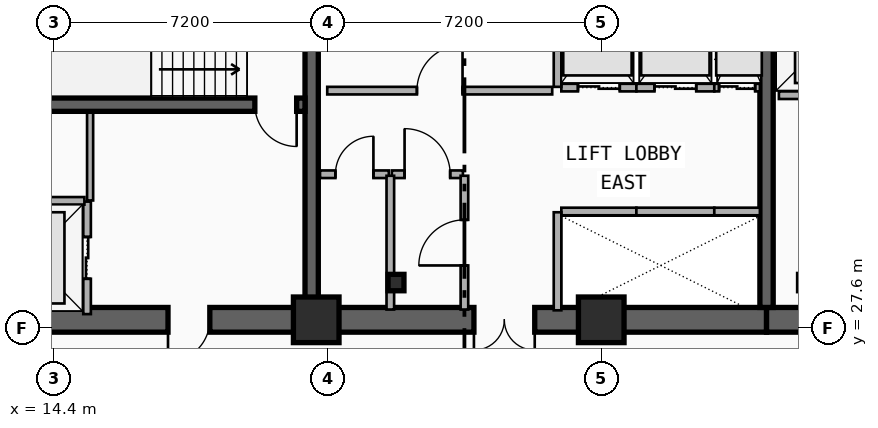
"""IFC4 building model, lengths in metres.
Left out: names, types, materials, properties, quantities, classifications, styles, units other than length and angle.
Written with IfcOpenShell. Run it as: python <this file> out.ifc"""

import sys

from ifc_helpers import new_model, si_unit, direction, frame, frame_2d, origin, origin_2d, place, context, subcontext, project, spatial, rectangle, i_section, extrude, element, fill, save


model = new_model("IFC4")
c1 = context("Model", 3, precision=1e-05, world=origin(), true_north=direction((0.0, 1.0)))
c2 = subcontext(c1, "Body", "Model", "MODEL_VIEW")
j1 = project(units=[si_unit("LENGTHUNIT", "METRE"), si_unit("PLANEANGLEUNIT", "RADIAN")], contexts=[c1])
p1 = place(None, origin())
s1 = spatial("IfcSite", under=j1, at=p1, CompositionType="ELEMENT")
p2 = place(p1, origin())
s2 = spatial("IfcBuilding", under=s1, at=p2, CompositionType="ELEMENT")
p3 = place(p2, frame((0.0, 0.0, 94.3)))
s3 = spatial("IfcBuildingStorey", under=s2, at=p3, CompositionType="ELEMENT", Elevation=94.3)
p4 = place(p3, frame((21.18, 27.82, 0.0), z_axis=(0.0, 0.0, 1.0), x_axis=(-1.0, 0.0, 0.0)))
e1 = element("IfcWall", 1, at=p4, inside=s3, PredefinedType="SHEAR", context=c2, shape_type="SweptSolid", body=[
    extrude(rectangle(XDim=9.03, YDim=0.65, at=frame_2d((4.515, 0.0))), origin(), (0.0, 0.0, 1.0), 3.5),
])
p5 = place(p4, frame((2.68, 0.0, 0.0)))
e2 = element("IfcOpeningElement", 2, at=p5, cuts=e1, PredefinedType="OPENING", context=c2, shape_type="SweptSolid", body=[
    extrude(rectangle(XDim=1.1, YDim=2.15, at=frame_2d((0.55, 1.075))), frame((0.0, 0.335, 0.0), z_axis=(0.0, -1.0, 0.0), x_axis=(1.0, 0.0, 0.0)), (0.0, 0.0, 1.0), 0.67),
])
p6 = place(p3, frame((33.15, 27.82, 0.0), z_axis=(0.0, 0.0, 1.0), x_axis=(-1.0, 0.0, 0.0)))
e3 = element("IfcWall", 3, at=p6, inside=s3, PredefinedType="SHEAR", context=c2, shape_type="SweptSolid", body=[
    extrude(rectangle(XDim=11.97, YDim=0.65, at=frame_2d((5.985, 0.0))), origin(), (0.0, 0.0, 1.0), 3.5),
])
p7 = place(p6, frame((6.1, 0.0, 0.0)))
e4 = element("IfcOpeningElement", 4, at=p7, cuts=e3, PredefinedType="OPENING", context=c2, shape_type="SweptSolid", body=[
    extrude(rectangle(XDim=1.6, YDim=2.2, at=frame_2d((0.8, 1.1))), frame((0.0, 0.335, 0.0), z_axis=(0.0, -1.0, 0.0), x_axis=(1.0, 0.0, 0.0)), (0.0, 0.0, 1.0), 0.67),
])
p8 = place(p3, frame((45.38, 27.82, 0.0), z_axis=(0.0, 0.0, 1.0), x_axis=(-1.0, 0.0, 0.0)))
e5 = element("IfcWall", 5, at=p8, inside=s3, PredefinedType="SHEAR", context=c2, shape_type="SweptSolid", body=[
    extrude(rectangle(XDim=12.23, YDim=0.65, at=frame_2d((6.115, 0.0))), origin(), (0.0, 0.0, 1.0), 3.5),
])
p9 = place(p8, frame((9.93, 0.0, 0.0)))
e6 = element("IfcOpeningElement", 6, at=p9, cuts=e5, PredefinedType="OPENING", context=c2, shape_type="SweptSolid", body=[
    extrude(rectangle(XDim=1.1, YDim=2.15, at=frame_2d((0.55, 1.075))), frame((0.0, 0.335, 0.0), z_axis=(0.0, -1.0, 0.0), x_axis=(1.0, 0.0, 0.0)), (0.0, 0.0, 1.0), 0.67),
])
p10 = place(p8, frame((6.23, 0.0, 0.0)))
e7 = element("IfcOpeningElement", 7, at=p10, cuts=e5, PredefinedType="OPENING", context=c2, shape_type="SweptSolid", body=[
    extrude(rectangle(XDim=1.1, YDim=2.15, at=frame_2d((0.55, 1.075))), frame((0.0, 0.335, 0.0), z_axis=(0.0, -1.0, 0.0), x_axis=(1.0, 0.0, 0.0)), (0.0, 0.0, 1.0), 0.67),
])
for number, where, z_axis, x_axis in (
    (8, (21.18, 28.145, 0.0), (0.0, 0.0, 1.0), (0.0, 1.0, 0.0)),
    (9, (33.15, 28.145, 0.0), (0.0, 0.0, 1.0), (0.0, 1.0, 0.0)),
):
    element("IfcWall", number, at=place(p3, frame(where, z_axis=z_axis, x_axis=x_axis)), inside=s3, PredefinedType="SHEAR", context=c2, shape_type="SweptSolid", body=[
        extrude(rectangle(XDim=8.58, YDim=0.35, at=frame_2d((4.29, 0.0))), origin(), (0.0, 0.0, 1.0), 3.5),
    ])
p11 = place(p3, frame((21.005, 33.48, 0.0), z_axis=(0.0, 0.0, 1.0), x_axis=(-1.0, 0.0, 0.0)))
e10 = element("IfcWall", 10, at=p11, inside=s3, PredefinedType="SHEAR", context=c2, shape_type="SweptSolid", body=[
    extrude(rectangle(XDim=8.53, YDim=0.35, at=frame_2d((4.265, 0.0))), origin(), (0.0, 0.0, 1.0), 3.5),
])
p12 = place(p11, frame((0.22, 0.0, 0.0)))
e11 = element("IfcOpeningElement", 11, at=p12, cuts=e10, PredefinedType="OPENING", context=c2, shape_type="SweptSolid", body=[
    extrude(rectangle(XDim=1.1, YDim=2.15, at=frame_2d((0.55, 1.075))), frame((0.0, 0.185, 0.0), z_axis=(0.0, -1.0, 0.0), x_axis=(1.0, 0.0, 0.0)), (0.0, 0.0, 1.0), 0.37),
])
p13 = place(p3, frame((23.4, 28.8, 0.0), z_axis=(0.0, 0.0, 1.0), x_axis=(1.0, 0.0, 0.0)))
e12 = element("IfcColumn", 12, at=p13, inside=s3, PredefinedType="COLUMN", context=c2, shape_type="SweptSolid", body=[
    extrude(i_section(OverallWidth=0.418, OverallDepth=0.432, WebThickness=0.035, FlangeThickness=0.056, FilletRadius=0.015, at=origin_2d()), origin(), (0.0, 0.0, 1.0), 3.5),
])
for number, where, z_axis, x_axis in (
    (13, (21.3, 27.82, 0.0), (0.0, 0.0, 1.0), (1.0, 0.0, 0.0)),
    (14, (28.8, 27.82, 0.0), (0.0, 0.0, 1.0), (1.0, 0.0, 0.0)),
):
    element("IfcColumn", number, at=place(p3, frame(where, z_axis=z_axis, x_axis=x_axis)), inside=s3, PredefinedType="COLUMN", context=c2, shape_type="SweptSolid", body=[
        extrude(rectangle(XDim=1.2, YDim=1.2, at=origin_2d()), origin(), (0.0, 0.0, 1.0), 3.5),
    ])
p14 = place(p3, frame((15.27, 27.97, 0.0), z_axis=(0.0, 0.0, 1.0), x_axis=(0.0, 1.0, 0.0)))
e15 = element("IfcWall", 15, at=p14, inside=s3, PredefinedType="PARTITIONING", context=c2, shape_type="SweptSolid", body=[
    extrude(rectangle(XDim=2.96, YDim=0.2, at=frame_2d((1.48, 0.0))), origin(), (0.0, 0.0, 1.0), 2.212),
])
p15 = place(p14, frame((0.93, 0.0, 0.0)))
e16 = element("IfcOpeningElement", 16, at=p15, cuts=e15, PredefinedType="OPENING", context=c2, shape_type="SweptSolid", body=[
    extrude(rectangle(XDim=1.1, YDim=2.15, at=frame_2d((0.55, 1.075))), frame((0.0, 0.11, 0.0), z_axis=(0.0, -1.0, 0.0), x_axis=(1.0, 0.0, 0.0)), (0.0, 0.0, 1.0), 0.22),
])
p16 = place(p3, frame((12.45, 30.95, 0.0), z_axis=(0.0, 0.0, 1.0), x_axis=(1.0, 0.0, 0.0)))
e17 = element("IfcWall", 17, at=p16, inside=s3, PredefinedType="PARTITIONING", context=c2, shape_type="SweptSolid", body=[
    extrude(rectangle(XDim=2.75, YDim=0.2, at=frame_2d((1.375, 0.0))), origin(), (0.0, 0.0, 1.0), 2.212),
])
p17 = place(p3, frame((33.475, 33.73, 0.0), z_axis=(0.0, 0.0, 1.0), x_axis=(1.0, 0.0, 0.0)))
e18 = element("IfcWall", 18, at=p17, inside=s3, PredefinedType="PARTITIONING", context=c2, shape_type="SweptSolid", body=[
    extrude(rectangle(XDim=2.725, YDim=0.2, at=frame_2d((1.362, 0.0))), origin(), (0.0, 0.0, 1.0), 2.212),
])
p18 = place(p17, frame((0.812, 0.0, 0.0)))
e19 = element("IfcOpeningElement", 19, at=p18, cuts=e18, PredefinedType="OPENING", context=c2, shape_type="SweptSolid", body=[
    extrude(rectangle(XDim=1.1, YDim=2.15, at=frame_2d((0.55, 1.075))), frame((0.0, 0.11, 0.0), z_axis=(0.0, -1.0, 0.0), x_axis=(1.0, 0.0, 0.0)), (0.0, 0.0, 1.0), 0.22),
])
p19 = place(p3, frame((27.75, 30.67, 0.0), z_axis=(0.0, 0.0, 1.0), x_axis=(1.0, 0.0, 0.0)))
e20 = element("IfcWall", 20, at=p19, inside=s3, PredefinedType="PARTITIONING", context=c2, shape_type="SweptSolid", body=[
    extrude(rectangle(XDim=1.975, YDim=0.2, at=frame_2d((0.988, 0.0))), origin(), (0.0, 0.0, 1.0), 2.212),
])
p20 = place(p3, frame((27.65, 28.07, 0.0), z_axis=(0.0, 0.0, 1.0), x_axis=(0.0, 1.0, 0.0)))
e21 = element("IfcWall", 21, at=p20, inside=s3, PredefinedType="PARTITIONING", context=c2, shape_type="SweptSolid", body=[
    extrude(rectangle(XDim=2.58, YDim=0.2, at=frame_2d((1.29, 0.0))), origin(), (0.0, 0.0, 1.0), 2.212),
])
p21 = place(p3, frame((29.725, 30.67, 0.0), z_axis=(0.0, 0.0, 1.0), x_axis=(1.0, 0.0, 0.0)))
e22 = element("IfcWall", 22, at=p21, inside=s3, PredefinedType="PARTITIONING", context=c2, shape_type="SweptSolid", body=[
    extrude(rectangle(XDim=2.05, YDim=0.2, at=frame_2d((1.025, 0.0))), origin(), (0.0, 0.0, 1.0), 2.62),
])
p22 = place(p3, frame((31.775, 30.67, 0.0), z_axis=(0.0, 0.0, 1.0), x_axis=(1.0, 0.0, 0.0)))
e23 = element("IfcWall", 23, at=p22, inside=s3, PredefinedType="PARTITIONING", context=c2, shape_type="SweptSolid", body=[
    extrude(rectangle(XDim=1.2, YDim=0.2, at=frame_2d((0.6, 0.0))), origin(), (0.0, 0.0, 1.0), 2.62),
])
p23 = place(p3, frame((27.75, 33.93, 0.0), z_axis=(0.0, 0.0, 1.0), x_axis=(1.0, 0.0, 0.0)))
e24 = element("IfcWall", 24, at=p23, inside=s3, PredefinedType="PARTITIONING", context=c2, shape_type="SweptSolid", body=[
    extrude(rectangle(XDim=1.975, YDim=0.2, at=frame_2d((0.988, 0.0))), origin(), (0.0, 0.0, 1.0), 2.212),
])
p24 = place(p23, frame((0.438, 0.0, 0.0)))
e25 = element("IfcOpeningElement", 25, at=p24, cuts=e24, PredefinedType="OPENING", context=c2, shape_type="SweptSolid", body=[
    extrude(rectangle(XDim=1.1, YDim=2.15, at=frame_2d((0.55, 1.075))), frame((0.0, 0.11, 0.0), z_axis=(0.0, -1.0, 0.0), x_axis=(1.0, 0.0, 0.0)), (0.0, 0.0, 1.0), 0.22),
])
p25 = place(p3, frame((27.65, 33.95, 0.0), z_axis=(0.0, 0.0, 1.0), x_axis=(0.0, 1.0, 0.0)))
e26 = element("IfcWall", 26, at=p25, inside=s3, PredefinedType="PARTITIONING", context=c2, shape_type="SweptSolid", body=[
    extrude(rectangle(XDim=2.68, YDim=0.2, at=frame_2d((1.34, 0.0))), origin(), (0.0, 0.0, 1.0), 2.212),
])
p26 = place(p3, frame((29.725, 33.93, 0.0), z_axis=(0.0, 0.0, 1.0), x_axis=(1.0, 0.0, 0.0)))
e27 = element("IfcWall", 27, at=p26, inside=s3, PredefinedType="PARTITIONING", context=c2, shape_type="SweptSolid", body=[
    extrude(rectangle(XDim=2.05, YDim=0.2, at=frame_2d((1.025, 0.0))), origin(), (0.0, 0.0, 1.0), 3.24),
])
p27 = place(p26, frame((0.475, 0.0, 0.0)))
e28 = element("IfcOpeningElement", 28, at=p27, cuts=e27, PredefinedType="OPENING", context=c2, shape_type="SweptSolid", body=[
    extrude(rectangle(XDim=1.1, YDim=2.15, at=frame_2d((0.55, 1.075))), frame((0.0, 0.11, 0.0), z_axis=(0.0, -1.0, 0.0), x_axis=(1.0, 0.0, 0.0)), (0.0, 0.0, 1.0), 0.22),
])
p28 = place(p3, frame((31.775, 33.93, 0.0), z_axis=(0.0, 0.0, 1.0), x_axis=(1.0, 0.0, 0.0)))
e29 = element("IfcWall", 29, at=p28, inside=s3, PredefinedType="PARTITIONING", context=c2, shape_type="SweptSolid", body=[
    extrude(rectangle(XDim=1.2, YDim=0.2, at=frame_2d((0.6, 0.0))), origin(), (0.0, 0.0, 1.0), 3.24),
])
p29 = place(p28, frame((0.125, 0.0, 0.0)))
e30 = element("IfcOpeningElement", 30, at=p29, cuts=e29, PredefinedType="OPENING", context=c2, shape_type="SweptSolid", body=[
    extrude(rectangle(XDim=0.95, YDim=2.15, at=frame_2d((0.475, 1.075))), frame((0.0, 0.11, 0.0), z_axis=(0.0, -1.0, 0.0), x_axis=(1.0, 0.0, 0.0)), (0.0, 0.0, 1.0), 0.22),
])
p30 = place(p3, frame((21.4, 31.65, 0.0), z_axis=(0.0, 0.0, 1.0), x_axis=(1.0, 0.0, 0.0)))
e31 = element("IfcWall", 31, at=p30, inside=s3, PredefinedType="PARTITIONING", context=c2, shape_type="SweptSolid", body=[
    extrude(rectangle(XDim=1.81, YDim=0.2, at=frame_2d((0.905, 0.0))), origin(), (0.0, 0.0, 1.0), 2.28),
])
p31 = place(p30, frame((0.405, 0.0, 0.0)))
e32 = element("IfcOpeningElement", 32, at=p31, cuts=e31, PredefinedType="OPENING", context=c2, shape_type="SweptSolid", body=[
    extrude(rectangle(XDim=1.0, YDim=2.15, at=frame_2d((0.5, 1.075))), frame((0.0, 0.11, 0.0), z_axis=(0.0, -1.0, 0.0), x_axis=(1.0, 0.0, 0.0)), (0.0, 0.0, 1.0), 0.22),
])
p32 = place(p3, frame((23.29, 31.65, 0.0), z_axis=(0.0, 0.0, 1.0), x_axis=(1.0, 0.0, 0.0)))
e33 = element("IfcWall", 33, at=p32, inside=s3, PredefinedType="PARTITIONING", context=c2, shape_type="SweptSolid", body=[
    extrude(rectangle(XDim=1.87, YDim=0.2, at=frame_2d((0.935, 0.0))), origin(), (0.0, 0.0, 1.0), 3.24),
])
p33 = place(p32, frame((0.335, 0.0, 0.0)))
e34 = element("IfcOpeningElement", 34, at=p33, cuts=e33, PredefinedType="OPENING", context=c2, shape_type="SweptSolid", body=[
    extrude(rectangle(XDim=1.2, YDim=2.15, at=frame_2d((0.6, 1.075))), frame((0.0, 0.11, 0.0), z_axis=(0.0, -1.0, 0.0), x_axis=(1.0, 0.0, 0.0)), (0.0, 0.0, 1.0), 0.22),
])
p34 = place(p3, frame((21.59, 33.85, 0.0), z_axis=(0.0, 0.0, 1.0), x_axis=(1.0, 0.0, 0.0)))
e35 = element("IfcWall", 35, at=p34, inside=s3, PredefinedType="PARTITIONING", context=c2, shape_type="SweptSolid", body=[
    extrude(rectangle(XDim=5.92, YDim=0.2, at=frame_2d((2.96, 0.0))), origin(), (0.0, 0.0, 1.0), 2.28),
])
p35 = place(p34, frame((2.36, 0.0, 0.0)))
e36 = element("IfcOpeningElement", 36, at=p35, cuts=e35, PredefinedType="OPENING", context=c2, shape_type="SweptSolid", body=[
    extrude(rectangle(XDim=1.2, YDim=2.15, at=frame_2d((0.6, 1.075))), frame((0.0, 0.11, 0.0), z_axis=(0.0, -1.0, 0.0), x_axis=(1.0, 0.0, 0.0)), (0.0, 0.0, 1.0), 0.22),
])
p36 = place(p3, frame((25.2, 28.09, 0.0), z_axis=(0.0, 0.0, 1.0), x_axis=(0.0, 1.0, 0.0)))
e37 = element("IfcWall", 37, at=p36, inside=s3, PredefinedType="PARTITIONING", context=c2, shape_type="SweptSolid", body=[
    extrude(rectangle(XDim=3.52, YDim=0.2, at=frame_2d((1.76, 0.0))), origin(), (0.0, 0.0, 1.0), 2.62),
])
p37 = place(p36, frame((1.16, 0.0, 0.0)))
e38 = element("IfcOpeningElement", 38, at=p37, cuts=e37, PredefinedType="OPENING", context=c2, shape_type="SweptSolid", body=[
    extrude(rectangle(XDim=1.2, YDim=2.15, at=frame_2d((0.6, 1.075))), frame((0.0, 0.11, 0.0), z_axis=(0.0, -1.0, 0.0), x_axis=(1.0, 0.0, 0.0)), (0.0, 0.0, 1.0), 0.22),
])
p38 = place(p3, frame((23.25, 28.09, 0.0), z_axis=(0.0, 0.0, 1.0), x_axis=(0.0, 1.0, 0.0)))
e39 = element("IfcWall", 39, at=p38, inside=s3, PredefinedType="PARTITIONING", context=c2, shape_type="SweptSolid", body=[
    extrude(rectangle(XDim=3.52, YDim=0.2, at=frame_2d((1.76, 0.0))), origin(), (0.0, 0.0, 1.0), 2.62),
])
p39 = place(p3, frame((15.35, 30.96, 0.0), z_axis=(0.0, 0.0, 1.0), x_axis=(0.0, 1.0, 0.0)))
e40 = element("IfcWall", 40, at=p39, inside=s3, PredefinedType="PARTITIONING", context=c2, shape_type="SweptSolid", body=[
    extrude(rectangle(XDim=2.31, YDim=0.16, at=frame_2d((1.155, 0.0))), origin(), (0.0, 0.0, 1.0), 3.24),
])
p40 = place(p15, origin())
e41 = element("IfcDoor", 41, at=p40, inside=s3, OperationType="DOUBLE_DOOR_SLIDING", PredefinedType="DOOR", context=c2, shape_type="SweptSolid", body=[
    extrude(rectangle(XDim=1.1, YDim=2.15, at=frame_2d((0.55, 1.075))), frame((0.0, 0.025, 0.0), z_axis=(0.0, -1.0, 0.0), x_axis=(1.0, 0.0, 0.0)), (0.0, 0.0, 1.0), 0.05),
])
fill(e16, e41)
p41 = place(p24, origin())
e42 = element("IfcDoor", 42, at=p41, inside=s3, OperationType="DOUBLE_DOOR_SLIDING", PredefinedType="DOOR", context=c2, shape_type="SweptSolid", body=[
    extrude(rectangle(XDim=1.1, YDim=2.15, at=frame_2d((0.55, 1.075))), frame((0.0, 0.025, 0.0), z_axis=(0.0, -1.0, 0.0), x_axis=(1.0, 0.0, 0.0)), (0.0, 0.0, 1.0), 0.05),
])
fill(e25, e42)
p42 = place(p27, origin())
e43 = element("IfcDoor", 43, at=p42, inside=s3, OperationType="DOUBLE_DOOR_SLIDING", PredefinedType="DOOR", context=c2, shape_type="SweptSolid", body=[
    extrude(rectangle(XDim=1.1, YDim=2.15, at=frame_2d((0.55, 1.075))), frame((0.0, 0.025, 0.0), z_axis=(0.0, -1.0, 0.0), x_axis=(1.0, 0.0, 0.0)), (0.0, 0.0, 1.0), 0.05),
])
fill(e28, e43)
p43 = place(p29, origin())
e44 = element("IfcDoor", 44, at=p43, inside=s3, OperationType="DOUBLE_DOOR_SLIDING", PredefinedType="DOOR", context=c2, shape_type="SweptSolid", body=[
    extrude(rectangle(XDim=0.95, YDim=2.15, at=frame_2d((0.475, 1.075))), frame((0.0, 0.025, 0.0), z_axis=(0.0, -1.0, 0.0), x_axis=(1.0, 0.0, 0.0)), (0.0, 0.0, 1.0), 0.05),
])
fill(e30, e44)
p44 = place(p12, origin())
e45 = element("IfcDoor", 45, at=p44, inside=s3, OperationType="SINGLE_SWING_LEFT", PredefinedType="DOOR", context=c2, shape_type="SweptSolid", body=[
    extrude(rectangle(XDim=1.1, YDim=2.15, at=frame_2d((0.55, 1.075))), frame((0.0, 0.025, 0.0), z_axis=(0.0, -1.0, 0.0), x_axis=(1.0, 0.0, 0.0)), (0.0, 0.0, 1.0), 0.05),
])
fill(e11, e45)
p45 = place(p5, origin())
e46 = element("IfcDoor", 46, at=p45, inside=s3, OperationType="SINGLE_SWING_RIGHT", PredefinedType="DOOR", context=c2, shape_type="SweptSolid", body=[
    extrude(rectangle(XDim=1.1, YDim=2.15, at=frame_2d((0.55, 1.075))), frame((0.0, 0.025, 0.0), z_axis=(0.0, -1.0, 0.0), x_axis=(1.0, 0.0, 0.0)), (0.0, 0.0, 1.0), 0.05),
])
fill(e2, e46)
p46 = place(p7, origin())
e47 = element("IfcDoor", 47, at=p46, inside=s3, OperationType="SINGLE_SWING_LEFT", PredefinedType="DOOR", context=c2, shape_type="SweptSolid", body=[
    extrude(rectangle(XDim=1.6, YDim=2.2, at=frame_2d((0.8, 1.1))), frame((0.0, 0.025, 0.0), z_axis=(0.0, -1.0, 0.0), x_axis=(1.0, 0.0, 0.0)), (0.0, 0.0, 1.0), 0.05),
])
fill(e4, e47)
p47 = place(p31, origin())
e48 = element("IfcDoor", 48, at=p47, inside=s3, OperationType="SINGLE_SWING_RIGHT", PredefinedType="DOOR", context=c2, shape_type="SweptSolid", body=[
    extrude(rectangle(XDim=1.0, YDim=2.15, at=frame_2d((0.5, 1.075))), frame((0.0, 0.025, 0.0), z_axis=(0.0, -1.0, 0.0), x_axis=(1.0, 0.0, 0.0)), (0.0, 0.0, 1.0), 0.05),
])
fill(e32, e48)
p48 = place(p33, origin())
e49 = element("IfcDoor", 49, at=p48, inside=s3, OperationType="SINGLE_SWING_LEFT", PredefinedType="DOOR", context=c2, shape_type="SweptSolid", body=[
    extrude(rectangle(XDim=1.2, YDim=2.15, at=frame_2d((0.6, 1.075))), frame((0.0, 0.025, 0.0), z_axis=(0.0, -1.0, 0.0), x_axis=(1.0, 0.0, 0.0)), (0.0, 0.0, 1.0), 0.05),
])
fill(e34, e49)
p49 = place(p35, origin())
e50 = element("IfcDoor", 50, at=p49, inside=s3, OperationType="SINGLE_SWING_RIGHT", PredefinedType="DOOR", context=c2, shape_type="SweptSolid", body=[
    extrude(rectangle(XDim=1.2, YDim=2.15, at=frame_2d((0.6, 1.075))), frame((0.0, 0.025, 0.0), z_axis=(0.0, -1.0, 0.0), x_axis=(1.0, 0.0, 0.0)), (0.0, 0.0, 1.0), 0.05),
])
fill(e36, e50)
p50 = place(p37, origin())
e51 = element("IfcDoor", 51, at=p50, inside=s3, OperationType="SINGLE_SWING_LEFT", PredefinedType="DOOR", context=c2, shape_type="SweptSolid", body=[
    extrude(rectangle(XDim=1.2, YDim=2.15, at=frame_2d((0.6, 1.075))), frame((0.0, 0.025, 0.0), z_axis=(0.0, -1.0, 0.0), x_axis=(1.0, 0.0, 0.0)), (0.0, 0.0, 1.0), 0.05),
])
fill(e38, e51)
save(model, sys.argv[1])
